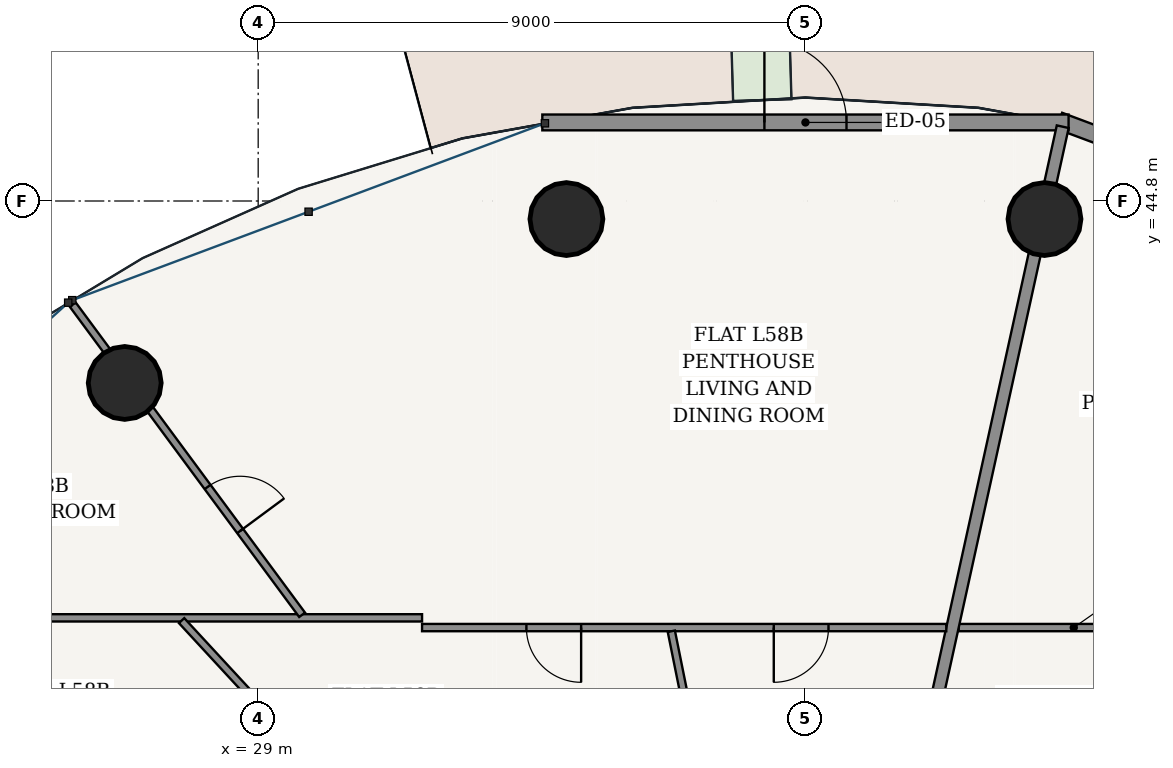
"""IFC4 building model, lengths in metres.
Left out: names, types, materials, properties, quantities, classifications, styles, units other than length and angle.
Written with IfcOpenShell. Run it as: python <this file> out.ifc"""

import sys

from ifc_helpers import new_model, si_unit, direction, frame, frame_2d, origin, origin_2d, place, context, subcontext, project, spatial, rectangle, hollow_circle, extrude, source, transform, mapped, element, fill, save


model = new_model("IFC4")
c1 = context("Model", 3, precision=1e-05, world=origin(), true_north=direction((-0.2419218956, 0.970295726276)))
c2 = subcontext(c1, "Body", "Model", "MODEL_VIEW")
j1 = project(units=[si_unit("LENGTHUNIT", "METRE"), si_unit("PLANEANGLEUNIT", "RADIAN")], contexts=[c1])
p1 = place(None, origin())
s1 = spatial("IfcSite", under=j1, at=p1, CompositionType="ELEMENT")
p2 = place(p1, origin())
s2 = spatial("IfcBuilding", under=s1, at=p2, CompositionType="ELEMENT")
p3 = place(p2, frame((0.0, 0.0, 220.8)))
s3 = spatial("IfcBuildingStorey", under=s2, at=p3, CompositionType="ELEMENT", Elevation=220.8)
for number, where, z_axis, x_axis in (
    (1, (41.931, 44.503, 0.0), (0.0, 0.0, 1.0), (1.0, 0.0, 0.0)),
    (2, (34.069, 44.503, 0.0), (0.0, 0.0, 1.0), (1.0, 0.0, 0.0)),
    (3, (26.805, 41.808, 0.0), (0.0, 0.0, 1.0), (1.0, 0.0, 0.0)),
):
    element("IfcColumn", number, at=place(p3, frame(where, z_axis=z_axis, x_axis=x_axis)), inside=s3, PredefinedType="COLUMN", context=c2, shape_type="SweptSolid", body=[
        extrude(hollow_circle(Radius=0.6, WallThickness=0.038, at=origin_2d()), origin(), (0.0, 0.0, 1.0), 3.7),
    ])
p4 = place(p3, frame((50.17, 43.127, 0.0), z_axis=(0.0, 0.0, 1.0), x_axis=(-0.936556918375, 0.350515532672, 0.0)))
e4 = element("IfcWall", 4, at=p4, inside=s3, PredefinedType="SOLIDWALL", context=c2, shape_type="SweptSolid", body=[
    extrude(rectangle(XDim=8.539, YDim=0.28, at=frame_2d((4.27, 0.0))), origin(), (0.0, 0.0, 1.0), 3.435),
])
p5 = place(p4, frame((1.256, 0.0, 0.85)))
e5 = element("IfcOpeningElement", 5, at=p5, cuts=e4, PredefinedType="OPENING", context=c2, shape_type="SweptSolid", body=[
    extrude(rectangle(XDim=2.1, YDim=1.95, at=frame_2d((1.05, 0.975))), frame((0.0, 0.15, 0.0), z_axis=(0.0, -1.0, 0.0), x_axis=(1.0, 0.0, 0.0)), (0.0, 0.0, 1.0), 0.3),
])
p6 = place(p4, frame((5.184, 0.0, 0.85)))
e6 = element("IfcOpeningElement", 6, at=p6, cuts=e4, PredefinedType="OPENING", context=c2, shape_type="SweptSolid", body=[
    extrude(rectangle(XDim=2.1, YDim=1.95, at=frame_2d((1.05, 0.975))), frame((0.0, 0.15, 0.0), z_axis=(0.0, -1.0, 0.0), x_axis=(1.0, 0.0, 0.0)), (0.0, 0.0, 1.0), 0.3),
])
p7 = place(p3, frame((42.327, 46.092, 0.0), z_axis=(0.0, 0.0, 1.0), x_axis=(-1.0, 0.0, 0.0)))
e7 = element("IfcWall", 7, at=p7, inside=s3, PredefinedType="SOLIDWALL", context=c2, shape_type="SweptSolid", body=[
    extrude(rectangle(XDim=8.654, YDim=0.26, at=frame_2d((4.327, 0.0))), origin(), (0.0, 0.0, 1.0), 3.435),
])
p8 = place(p7, frame((3.652, 0.0, 0.0)))
e8 = element("IfcOpeningElement", 8, at=p8, cuts=e7, PredefinedType="OPENING", context=c2, shape_type="SweptSolid", body=[
    extrude(rectangle(XDim=1.35, YDim=2.2, at=frame_2d((0.675, 1.1))), frame((0.0, 0.14, 0.0), z_axis=(0.0, -1.0, 0.0), x_axis=(1.0, 0.0, 0.0)), (0.0, 0.0, 1.0), 0.28),
])
p9 = place(p3, frame((40.52, 37.785, 0.0), z_axis=(0.0, 0.0, 1.0), x_axis=(1.0, 0.0, 0.0)))
e9 = element("IfcWall", 9, at=p9, inside=s3, PredefinedType="PARTITIONING", context=c2, shape_type="SweptSolid", body=[
    extrude(rectangle(XDim=3.785, YDim=0.12, at=frame_2d((1.893, 0.0))), origin(), (0.0, 0.0, 1.0), 2.951),
])
p10 = place(p3, frame((39.811, 35.027, 0.0), z_axis=(0.0, 0.0, 1.0), x_axis=(0.214966857327, 0.976621344356, 0.0)))
e10 = element("IfcWall", 10, at=p10, inside=s3, PredefinedType="PARTITIONING", context=c2, shape_type="SweptSolid", body=[
    extrude(rectangle(XDim=11.258, YDim=0.2, at=frame_2d((5.629, 0.0))), origin(), (0.0, 0.0, 1.0), 2.52),
])
p11 = place(p3, frame((24.005, 37.945, 0.0), z_axis=(0.0, 0.0, 1.0), x_axis=(1.0, 0.0, 0.0)))
e11 = element("IfcWall", 11, at=p11, inside=s3, PredefinedType="PARTITIONING", context=c2, shape_type="SweptSolid", body=[
    extrude(rectangle(XDim=7.69, YDim=0.12, at=frame_2d((3.845, 0.0))), origin(), (0.0, 0.0, 1.0), 2.951),
])
p12 = place(p3, frame((31.695, 37.785, 0.0), z_axis=(0.0, 0.0, 1.0), x_axis=(1.0, 0.0, 0.0)))
e12 = element("IfcWall", 12, at=p12, inside=s3, PredefinedType="PARTITIONING", context=c2, shape_type="SweptSolid", body=[
    extrude(rectangle(XDim=8.621, YDim=0.12, at=frame_2d((4.311, 0.0))), origin(), (0.0, 0.0, 1.0), 2.951),
])
p13 = place(p12, frame((1.716, 0.0, 0.0)))
e13 = element("IfcOpeningElement", 13, at=p13, cuts=e12, PredefinedType="OPENING", context=c2, shape_type="SweptSolid", body=[
    extrude(rectangle(XDim=0.9, YDim=2.15, at=frame_2d((0.45, 1.075))), frame((0.0, 0.07, 0.0), z_axis=(0.0, -1.0, 0.0), x_axis=(1.0, 0.0, 0.0)), (0.0, 0.0, 1.0), 0.14),
])
p14 = place(p12, frame((5.784, 0.0, 0.0)))
e14 = element("IfcOpeningElement", 14, at=p14, cuts=e12, PredefinedType="OPENING", context=c2, shape_type="SweptSolid", body=[
    extrude(rectangle(XDim=0.9, YDim=2.15, at=frame_2d((0.45, 1.075))), frame((0.0, 0.07, 0.0), z_axis=(0.0, -1.0, 0.0), x_axis=(1.0, 0.0, 0.0)), (0.0, 0.0, 1.0), 0.14),
])
p15 = place(p3, frame((29.722, 37.995, 0.0), z_axis=(0.0, 0.0, 1.0), x_axis=(-0.594518724985, 0.80408176552, 0.0)))
e15 = element("IfcWall", 15, at=p15, inside=s3, PredefinedType="PARTITIONING", context=c2, shape_type="SweptSolid", body=[
    extrude(rectangle(XDim=6.344, YDim=0.12, at=frame_2d((3.172, 0.0))), origin(), (0.0, 0.0, 1.0), 2.951),
])
p16 = place(p15, frame((1.715, 0.0, 0.0)))
e16 = element("IfcOpeningElement", 16, at=p16, cuts=e15, PredefinedType="OPENING", context=c2, shape_type="SweptSolid", body=[
    extrude(rectangle(XDim=0.9, YDim=2.15, at=frame_2d((0.45, 1.075))), frame((0.0, 0.07, 0.0), z_axis=(0.0, -1.0, 0.0), x_axis=(1.0, 0.0, 0.0)), (0.0, 0.0, 1.0), 0.14),
])
p17 = place(p3, frame((36.339, 35.027, 0.0), z_axis=(0.0, 0.0, 1.0), x_axis=(-0.197856196381, 0.980231057228, 0.0)))
e17 = element("IfcWall", 17, at=p17, inside=s3, PredefinedType="PARTITIONING", context=c2, shape_type="SweptSolid", body=[
    extrude(rectangle(XDim=2.752, YDim=0.12, at=frame_2d((1.376, 0.0))), origin(), (0.0, 0.0, 1.0), 2.52),
])
p18 = place(p3, frame((30.396, 35.026, 0.0), z_axis=(0.0, 0.0, 1.0), x_axis=(-0.678759446058, 0.734360684124, 0.0)))
e18 = element("IfcWall", 18, at=p18, inside=s3, PredefinedType="PARTITIONING", context=c2, shape_type="SweptSolid", body=[
    extrude(rectangle(XDim=3.912, YDim=0.12, at=frame_2d((1.956, 0.0))), origin(), (0.0, 0.0, 1.0), 2.951),
])
m1 = source(origin(), c2, "Body", "SweptSolid", [
    extrude(rectangle(XDim=1.35, YDim=2.2, at=frame_2d((0.675, 1.1))), frame((0.0, 0.025, 0.0), z_axis=(0.0, -1.0, 0.0), x_axis=(1.0, 0.0, 0.0)), (0.0, 0.0, 1.0), 0.05),
])
p19 = place(p8, frame((1.35, 0.0, 0.0), z_axis=(0.0, 0.0, 1.0), x_axis=(-1.0, 0.0, 0.0)))
e19 = element("IfcDoor", 19, at=p19, inside=s3, OperationType="SINGLE_SWING_LEFT", PredefinedType="DOOR", context=c2, shape_type="MappedRepresentation", body=[
    mapped(m1, transform((0.0, 0.0, 0.0), scale=1.0)),
])
fill(e8, e19)
m2 = source(origin(), c2, "Body", "SweptSolid", [
    extrude(rectangle(XDim=0.9, YDim=2.15, at=frame_2d((0.45, 1.075))), frame((0.0, 0.025, 0.0), z_axis=(0.0, -1.0, 0.0), x_axis=(1.0, 0.0, 0.0)), (0.0, 0.0, 1.0), 0.05),
])
p20 = place(p16, frame((0.9, 0.0, 0.0), z_axis=(0.0, 0.0, 1.0), x_axis=(-1.0, 0.0, 0.0)))
e20 = element("IfcDoor", 20, at=p20, inside=s3, OperationType="SINGLE_SWING_RIGHT", PredefinedType="DOOR", context=c2, shape_type="MappedRepresentation", body=[
    mapped(m2, transform((0.0, 0.0, 0.0), scale=1.0)),
])
fill(e16, e20)
p21 = place(p13, frame((0.9, 0.0, 0.0), z_axis=(0.0, 0.0, 1.0), x_axis=(-1.0, 0.0, 0.0)))
e21 = element("IfcDoor", 21, at=p21, inside=s3, OperationType="SINGLE_SWING_LEFT", PredefinedType="DOOR", context=c2, shape_type="MappedRepresentation", body=[
    mapped(m2, transform((0.0, 0.0, 0.0), scale=1.0)),
])
fill(e13, e21)
p22 = place(p14, frame((0.9, 0.0, 0.0), z_axis=(0.0, 0.0, 1.0), x_axis=(-1.0, 0.0, 0.0)))
e22 = element("IfcDoor", 22, at=p22, inside=s3, OperationType="SINGLE_SWING_RIGHT", PredefinedType="DOOR", context=c2, shape_type="MappedRepresentation", body=[
    mapped(m2, transform((0.0, 0.0, 0.0), scale=1.0)),
])
fill(e14, e22)
save(model, sys.argv[1])
